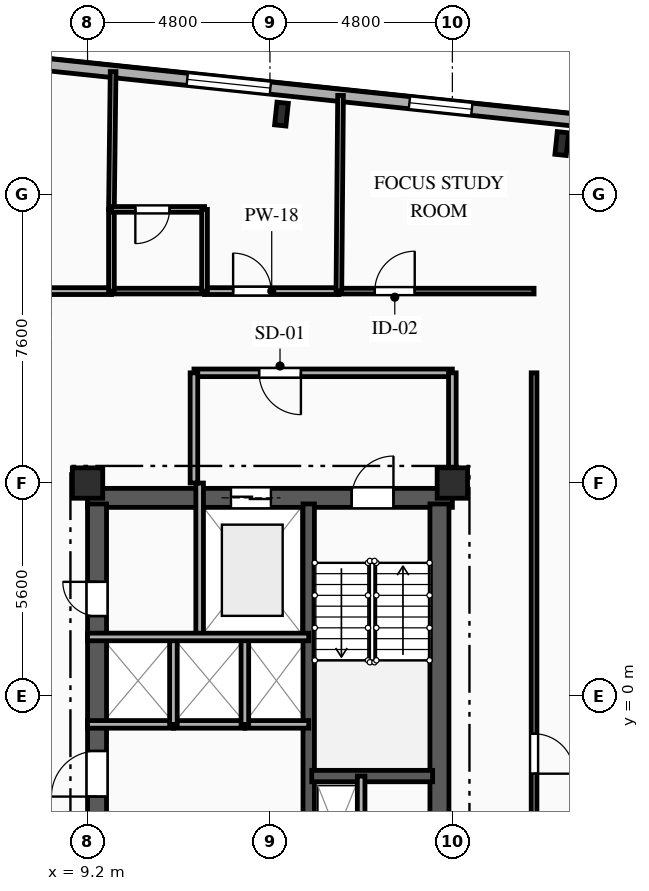
"""IFC4 building model, lengths in metres.
Left out: names, types, materials, properties, quantities, classifications, styles, units other than length and angle.
Written with IfcOpenShell. Run it as: python <this file> out.ifc"""

import sys

from ifc_helpers import new_model, si_unit, direction, frame, frame_2d, origin, origin_2d, place, context, subcontext, project, spatial, rectangle, i_section, extrude, element, fill, save


model = new_model("IFC4")
c1 = context("Model", 3, precision=1e-05, world=origin(), true_north=direction((0.0, 1.0)))
c2 = subcontext(c1, "Body", "Model", "MODEL_VIEW")
j1 = project(units=[si_unit("LENGTHUNIT", "METRE"), si_unit("PLANEANGLEUNIT", "RADIAN")], contexts=[c1])
p1 = place(None, origin())
s1 = spatial("IfcSite", under=j1, at=p1, CompositionType="ELEMENT")
p2 = place(p1, origin())
s2 = spatial("IfcBuilding", under=s1, at=p2, CompositionType="ELEMENT")
p3 = place(p2, frame((0.0, 0.0, 186.35)))
s3 = spatial("IfcBuildingStorey", under=s2, at=p3, CompositionType="ELEMENT", Elevation=186.35)
for number, where, z_axis, x_axis in (
    (1, (9.2, 5.6, 0.0), (0.0, 0.0, 1.0), (1.0, 0.0, 0.0)),
    (2, (18.8, 5.6, 0.0), (0.0, 0.0, 1.0), (1.0, 0.0, 0.0)),
):
    element("IfcColumn", number, at=place(p3, frame(where, z_axis=z_axis, x_axis=x_axis)), inside=s3, PredefinedType="COLUMN", context=c2, shape_type="SweptSolid", body=[
        extrude(rectangle(XDim=0.8, YDim=0.8, at=origin_2d()), origin(), (0.0, 0.0, 1.0), 3.35),
    ])
for number, where, z_axis, x_axis in (
    (3, (21.679, 14.532, 0.0), (0.0, 0.0, 1.0), (0.995, -0.105, 0.0)),
    (4, (14.303, 15.308, 0.0), (0.0, 0.0, 1.0), (0.995, -0.105, 0.0)),
):
    element("IfcColumn", number, at=place(p3, frame(where, z_axis=z_axis, x_axis=x_axis)), inside=s3, PredefinedType="COLUMN", context=c2, shape_type="SweptSolid", body=[
        extrude(i_section(OverallWidth=0.3, OverallDepth=0.6, WebThickness=0.015, FlangeThickness=0.03, FilletRadius=0.027, at=origin_2d()), origin(), (0.0, 0.0, 1.0), 3.35),
    ])
p4 = place(p3, frame((-23.156, 19.898, 0.0), z_axis=(0.0, 0.0, 1.0), x_axis=(0.994522001802, -0.104527450613, 0.0)))
e5 = element("IfcWall", 5, at=p4, inside=s3, PredefinedType="SOLIDWALL", context=c2, shape_type="SweptSolid", body=[
    extrude(rectangle(XDim=45.8, YDim=0.32, at=frame_2d((22.9, 0.0))), origin(), (0.0, 0.0, 1.0), 3.04),
])
p5 = place(p4, frame((4.94, 0.0, 0.85)))
e6 = element("IfcOpeningElement", 6, at=p5, cuts=e5, PredefinedType="OPENING", context=c2, shape_type="SweptSolid", body=[
    extrude(rectangle(XDim=1.65, YDim=1.85, at=frame_2d((0.825, 0.925))), frame((0.0, 0.17, 0.0), z_axis=(0.0, -1.0, 0.0), x_axis=(1.0, 0.0, 0.0)), (0.0, 0.0, 1.0), 0.34),
])
p6 = place(p4, frame((12.622, 0.0, 0.85)))
e7 = element("IfcOpeningElement", 7, at=p6, cuts=e5, PredefinedType="OPENING", context=c2, shape_type="SweptSolid", body=[
    extrude(rectangle(XDim=1.5, YDim=1.85, at=frame_2d((0.75, 0.925))), frame((0.0, 0.17, 0.0), z_axis=(0.0, -1.0, 0.0), x_axis=(1.0, 0.0, 0.0)), (0.0, 0.0, 1.0), 0.34),
])
p7 = place(p4, frame((17.116, 0.0, 0.85)))
e8 = element("IfcOpeningElement", 8, at=p7, cuts=e5, PredefinedType="OPENING", context=c2, shape_type="SweptSolid", body=[
    extrude(rectangle(XDim=2.2, YDim=1.85, at=frame_2d((1.1, 0.925))), frame((0.0, 0.17, 0.0), z_axis=(0.0, -1.0, 0.0), x_axis=(1.0, 0.0, 0.0)), (0.0, 0.0, 1.0), 0.34),
])
p8 = place(p4, frame((23.121, 0.0, 0.85)))
e9 = element("IfcOpeningElement", 9, at=p8, cuts=e5, PredefinedType="OPENING", context=c2, shape_type="SweptSolid", body=[
    extrude(rectangle(XDim=2.2, YDim=1.85, at=frame_2d((1.1, 0.925))), frame((0.0, 0.17, 0.0), z_axis=(0.0, -1.0, 0.0), x_axis=(1.0, 0.0, 0.0)), (0.0, 0.0, 1.0), 0.34),
])
p9 = place(p4, frame((29.126, 0.0, 0.85)))
e10 = element("IfcOpeningElement", 10, at=p9, cuts=e5, PredefinedType="OPENING", context=c2, shape_type="SweptSolid", body=[
    extrude(rectangle(XDim=2.2, YDim=1.85, at=frame_2d((1.1, 0.925))), frame((0.0, 0.17, 0.0), z_axis=(0.0, -1.0, 0.0), x_axis=(1.0, 0.0, 0.0)), (0.0, 0.0, 1.0), 0.34),
])
p10 = place(p4, frame((35.172, 0.0, 0.85)))
e11 = element("IfcOpeningElement", 11, at=p10, cuts=e5, PredefinedType="OPENING", context=c2, shape_type="SweptSolid", body=[
    extrude(rectangle(XDim=2.2, YDim=1.85, at=frame_2d((1.1, 0.925))), frame((0.0, 0.17, 0.0), z_axis=(0.0, -1.0, 0.0), x_axis=(1.0, 0.0, 0.0)), (0.0, 0.0, 1.0), 0.34),
])
p11 = place(p4, frame((41.052, 0.0, 0.85)))
e12 = element("IfcOpeningElement", 12, at=p11, cuts=e5, PredefinedType="OPENING", context=c2, shape_type="SweptSolid", body=[
    extrude(rectangle(XDim=1.65, YDim=1.85, at=frame_2d((0.825, 0.925))), frame((0.0, 0.17, 0.0), z_axis=(0.0, -1.0, 0.0), x_axis=(1.0, 0.0, 0.0)), (0.0, 0.0, 1.0), 0.34),
])
p12 = place(p3, frame((9.2, 5.21, 0.0), z_axis=(0.0, 0.0, 1.0), x_axis=(1.0, 0.0, 0.0)))
e13 = element("IfcWall", 13, at=p12, inside=s3, PredefinedType="SHEAR", context=c2, shape_type="SweptSolid", body=[
    extrude(rectangle(XDim=9.6, YDim=0.5, at=frame_2d((4.8, 0.0))), origin(), (0.0, 0.0, 1.0), 3.04),
])
p13 = place(p12, frame((6.95, 0.0, 0.0)))
e14 = element("IfcOpeningElement", 14, at=p13, cuts=e13, PredefinedType="OPENING", context=c2, shape_type="SweptSolid", body=[
    extrude(rectangle(XDim=1.1, YDim=2.15, at=frame_2d((0.55, 1.075))), frame((0.0, 0.26, 0.0), z_axis=(0.0, -1.0, 0.0), x_axis=(1.0, 0.0, 0.0)), (0.0, 0.0, 1.0), 0.52),
])
p14 = place(p12, frame((3.775, 0.0, 0.0)))
e15 = element("IfcOpeningElement", 15, at=p14, cuts=e13, PredefinedType="OPENING", context=c2, shape_type="SweptSolid", body=[
    extrude(rectangle(XDim=1.05, YDim=2.1, at=frame_2d((0.525, 1.05))), frame((0.0, 0.26, 0.0), z_axis=(0.0, -1.0, 0.0), x_axis=(1.0, 0.0, 0.0)), (0.0, 0.0, 1.0), 0.52),
])
p15 = place(p3, frame((9.45, -5.05, 0.0), z_axis=(0.0, 0.0, 1.0), x_axis=(0.0, 1.0, 0.0)))
e16 = element("IfcWall", 16, at=p15, inside=s3, PredefinedType="SHEAR", context=c2, shape_type="SweptSolid", body=[
    extrude(rectangle(XDim=10.1, YDim=0.5, at=frame_2d((5.05, 0.0))), origin(), (0.0, 0.0, 1.0), 3.04),
])
p16 = place(p15, frame((7.15, 0.0, 0.0)))
e17 = element("IfcOpeningElement", 17, at=p16, cuts=e16, PredefinedType="OPENING", context=c2, shape_type="SweptSolid", body=[
    extrude(rectangle(XDim=0.9, YDim=2.1, at=frame_2d((0.45, 1.05))), frame((0.0, 0.26, 0.0), z_axis=(0.0, -1.0, 0.0), x_axis=(1.0, 0.0, 0.0)), (0.0, 0.0, 1.0), 0.52),
])
p17 = place(p15, frame((2.4, 0.0, 0.0)))
e18 = element("IfcOpeningElement", 18, at=p17, cuts=e16, PredefinedType="OPENING", context=c2, shape_type="SweptSolid", body=[
    extrude(rectangle(XDim=1.2, YDim=2.15, at=frame_2d((0.6, 1.075))), frame((0.0, 0.26, 0.0), z_axis=(0.0, -1.0, 0.0), x_axis=(1.0, 0.0, 0.0)), (0.0, 0.0, 1.0), 0.52),
])
p18 = place(p3, frame((18.46, -5.05, 0.0), z_axis=(0.0, 0.0, 1.0), x_axis=(0.0, 1.0, 0.0)))
e19 = element("IfcWall", 19, at=p18, inside=s3, PredefinedType="SHEAR", context=c2, shape_type="SweptSolid", body=[
    extrude(rectangle(XDim=10.1, YDim=0.5, at=frame_2d((5.05, 0.0))), origin(), (0.0, 0.0, 1.0), 3.04),
])
p19 = place(p3, frame((15.02, -5.05, 0.0), z_axis=(0.0, 0.0, 1.0), x_axis=(0.0, 1.0, 0.0)))
e20 = element("IfcWall", 20, at=p19, inside=s3, PredefinedType="SHEAR", context=c2, shape_type="SweptSolid", body=[
    extrude(rectangle(XDim=10.1, YDim=0.3, at=frame_2d((5.05, 0.0))), origin(), (0.0, 0.0, 1.0), 3.04),
])
p20 = place(p3, frame((15.1, -2.11, 0.0), z_axis=(0.0, 0.0, 1.0), x_axis=(1.0, 0.0, 0.0)))
e21 = element("IfcWall", 21, at=p20, inside=s3, PredefinedType="SHEAR", context=c2, shape_type="SweptSolid", body=[
    extrude(rectangle(XDim=3.18, YDim=0.3, at=frame_2d((1.59, 0.0))), origin(), (0.0, 0.0, 1.0), 3.04),
])
p21 = place(p3, frame((16.4, -2.11, 0.0), z_axis=(0.0, 0.0, 1.0), x_axis=(0.0, -1.0, 0.0)))
e22 = element("IfcWall", 22, at=p21, inside=s3, PredefinedType="PARTITIONING", context=c2, shape_type="SweptSolid", body=[
    extrude(rectangle(XDim=3.49, YDim=0.2, at=frame_2d((1.745, 0.0))), origin(), (0.0, 0.0, 1.0), 3.04),
])
p22 = place(p3, frame((12.15, 5.6, 0.0), z_axis=(0.0, 0.0, 1.0), x_axis=(0.0, -1.0, 0.0)))
e23 = element("IfcWall", 23, at=p22, inside=s3, PredefinedType="PARTITIONING", context=c2, shape_type="SweptSolid", body=[
    extrude(rectangle(XDim=4.05, YDim=0.2, at=frame_2d((2.025, 0.0))), origin(), (0.0, 0.0, 1.0), 3.04),
])
p23 = place(p3, frame((18.8, 8.5, 0.0), z_axis=(0.0, 0.0, 1.0), x_axis=(-1.0, 0.0, 0.0)))
e24 = element("IfcWall", 24, at=p23, inside=s3, PredefinedType="PARTITIONING", context=c2, shape_type="SweptSolid", body=[
    extrude(rectangle(XDim=6.8, YDim=0.2, at=frame_2d((3.4, 0.0))), origin(), (0.0, 0.0, 1.0), 3.04),
])
p24 = place(p23, frame((3.985, 0.0, 0.0)))
e25 = element("IfcOpeningElement", 25, at=p24, cuts=e24, PredefinedType="OPENING", context=c2, shape_type="SweptSolid", body=[
    extrude(rectangle(XDim=1.1, YDim=2.15, at=frame_2d((0.55, 1.075))), frame((0.0, 0.11, 0.0), z_axis=(0.0, -1.0, 0.0), x_axis=(1.0, 0.0, 0.0)), (0.0, 0.0, 1.0), 0.22),
])
p25 = place(p3, frame((18.8, 5.6, 0.0), z_axis=(0.0, 0.0, 1.0), x_axis=(0.0, 1.0, 0.0)))
e26 = element("IfcWall", 26, at=p25, inside=s3, PredefinedType="PARTITIONING", context=c2, shape_type="SweptSolid", body=[
    extrude(rectangle(XDim=2.9, YDim=0.2, at=frame_2d((1.45, 0.0))), origin(), (0.0, 0.0, 1.0), 2.665),
])
p26 = place(p3, frame((12.0, 8.5, 0.0), z_axis=(0.0, 0.0, 1.0), x_axis=(0.0, -1.0, 0.0)))
e27 = element("IfcWall", 27, at=p26, inside=s3, PredefinedType="PARTITIONING", context=c2, shape_type="SweptSolid", body=[
    extrude(rectangle(XDim=2.9, YDim=0.2, at=frame_2d((1.45, 0.0))), origin(), (0.0, 0.0, 1.0), 3.04),
])
p27 = place(p3, frame((11.46, -0.75, 0.0), z_axis=(0.0, 0.0, 1.0), x_axis=(-1.0, 0.0, 0.0)))
e28 = element("IfcWall", 28, at=p27, inside=s3, PredefinedType="PARTITIONING", context=c2, shape_type="SweptSolid", body=[
    extrude(rectangle(XDim=2.26, YDim=0.2, at=frame_2d((1.13, 0.0))), origin(), (0.0, 0.0, 1.0), 3.04),
])
p28 = place(p3, frame((13.34, -0.75, 0.0), z_axis=(0.0, 0.0, 1.0), x_axis=(-1.0, 0.0, 0.0)))
e29 = element("IfcWall", 29, at=p28, inside=s3, PredefinedType="PARTITIONING", context=c2, shape_type="SweptSolid", body=[
    extrude(rectangle(XDim=1.88, YDim=0.2, at=frame_2d((0.94, 0.0))), origin(), (0.0, 0.0, 1.0), 3.04),
])
p29 = place(p3, frame((15.02, -0.75, 0.0), z_axis=(0.0, 0.0, 1.0), x_axis=(-1.0, 0.0, 0.0)))
e30 = element("IfcWall", 30, at=p29, inside=s3, PredefinedType="PARTITIONING", context=c2, shape_type="SweptSolid", body=[
    extrude(rectangle(XDim=1.68, YDim=0.2, at=frame_2d((0.84, 0.0))), origin(), (0.0, 0.0, 1.0), 3.04),
])
for number, where, z_axis, x_axis in (
    (31, (11.46, -0.75, 0.0), (0.0, 0.0, 1.0), (0.0, 1.0, 0.0)),
    (32, (13.34, -0.75, 0.0), (0.0, 0.0, 1.0), (0.0, 1.0, 0.0)),
):
    element("IfcWall", number, at=place(p3, frame(where, z_axis=z_axis, x_axis=x_axis)), inside=s3, PredefinedType="PARTITIONING", context=c2, shape_type="SweptSolid", body=[
        extrude(rectangle(XDim=2.3, YDim=0.2, at=frame_2d((1.15, 0.0))), origin(), (0.0, 0.0, 1.0), 3.04),
    ])
p30 = place(p3, frame((6.293, 10.65, 0.0), z_axis=(0.0, 0.0, 1.0), x_axis=(1.0, 0.0, 0.0)))
e33 = element("IfcWall", 33, at=p30, inside=s3, PredefinedType="PARTITIONING", context=c2, shape_type="SweptSolid", body=[
    extrude(rectangle(XDim=3.536, YDim=0.18, at=frame_2d((1.768, 0.0))), origin(), (0.0, 0.0, 1.0), 3.04),
])
p31 = place(p30, frame((0.752, 0.0, 0.0)))
e34 = element("IfcOpeningElement", 34, at=p31, cuts=e33, PredefinedType="OPENING", context=c2, shape_type="SweptSolid", body=[
    extrude(rectangle(XDim=1.0, YDim=2.15, at=frame_2d((0.5, 1.075))), frame((0.0, 0.1, 0.0), z_axis=(0.0, -1.0, 0.0), x_axis=(1.0, 0.0, 0.0)), (0.0, 0.0, 1.0), 0.2),
])
p32 = place(p3, frame((12.279, 10.65, 0.0), z_axis=(0.0, 0.0, 1.0), x_axis=(1.0, 0.0, 0.0)))
e35 = element("IfcWall", 35, at=p32, inside=s3, PredefinedType="PARTITIONING", context=c2, shape_type="SweptSolid", body=[
    extrude(rectangle(XDim=3.535, YDim=0.18, at=frame_2d((1.768, 0.0))), origin(), (0.0, 0.0, 1.0), 3.04),
])
p33 = place(p32, frame((0.752, 0.0, 0.0)))
e36 = element("IfcOpeningElement", 36, at=p33, cuts=e35, PredefinedType="OPENING", context=c2, shape_type="SweptSolid", body=[
    extrude(rectangle(XDim=1.0, YDim=2.15, at=frame_2d((0.5, 1.075))), frame((0.0, 0.1, 0.0), z_axis=(0.0, -1.0, 0.0), x_axis=(1.0, 0.0, 0.0)), (0.0, 0.0, 1.0), 0.2),
])
p34 = place(p3, frame((9.829, 10.65, 0.0), z_axis=(0.0, 0.0, 1.0), x_axis=(1.0, 0.0, 0.0)))
e37 = element("IfcWall", 37, at=p34, inside=s3, PredefinedType="PLUMBINGWALL", context=c2, shape_type="SweptSolid", body=[
    extrude(rectangle(XDim=2.45, YDim=0.15, at=frame_2d((1.225, 0.0))), origin(), (0.0, 0.0, 1.0), 3.04),
])
p35 = place(p3, frame((15.814, 10.65, 0.0), z_axis=(0.0, 0.0, 1.0), x_axis=(1.0, 0.0, 0.0)))
e38 = element("IfcWall", 38, at=p35, inside=s3, PredefinedType="PARTITIONING", context=c2, shape_type="SweptSolid", body=[
    extrude(rectangle(XDim=5.136, YDim=0.15, at=frame_2d((2.568, 0.0))), origin(), (0.0, 0.0, 1.0), 3.04),
])
p36 = place(p35, frame((0.946, 0.0, 0.0)))
e39 = element("IfcOpeningElement", 39, at=p36, cuts=e38, PredefinedType="OPENING", context=c2, shape_type="SweptSolid", body=[
    extrude(rectangle(XDim=1.05, YDim=2.15, at=frame_2d((0.525, 1.075))), frame((0.0, 0.085, 0.0), z_axis=(0.0, -1.0, 0.0), x_axis=(1.0, 0.0, 0.0)), (0.0, 0.0, 1.0), 0.17),
])
p37 = place(p3, frame((20.95, 8.5, 0.0), z_axis=(0.0, 0.0, 1.0), x_axis=(0.0, -1.0, 0.0)))
e40 = element("IfcWall", 40, at=p37, inside=s3, PredefinedType="PARTITIONING", context=c2, shape_type="SweptSolid", body=[
    extrude(rectangle(XDim=14.1, YDim=0.15, at=frame_2d((7.05, 0.0))), origin(), (0.0, 0.0, 1.0), 2.695),
])
p38 = place(p37, frame((9.498, 0.0, 0.0)))
e41 = element("IfcOpeningElement", 41, at=p38, cuts=e40, PredefinedType="OPENING", context=c2, shape_type="SweptSolid", body=[
    extrude(rectangle(XDim=1.05, YDim=2.15, at=frame_2d((0.525, 1.075))), frame((0.0, 0.085, 0.0), z_axis=(0.0, -1.0, 0.0), x_axis=(1.0, 0.0, 0.0)), (0.0, 0.0, 1.0), 0.17),
])
p39 = place(p3, frame((9.873, 16.427, 0.0), z_axis=(0.0, 0.0, 1.0), x_axis=(-0.012048129237, -0.999927418657, 0.0)))
e42 = element("IfcWall", 42, at=p39, inside=s3, PredefinedType="PARTITIONING", context=c2, shape_type="SweptSolid", body=[
    extrude(rectangle(XDim=3.627, YDim=0.15, at=frame_2d((1.813, 0.0))), origin(), (0.0, 0.0, 1.0), 3.04),
])
p40 = place(p3, frame((9.829, 12.8, 0.0), z_axis=(0.0, 0.0, 1.0), x_axis=(0.0, -1.0, 0.0)))
e43 = element("IfcWall", 43, at=p40, inside=s3, PredefinedType="PLUMBINGWALL", context=c2, shape_type="SweptSolid", body=[
    extrude(rectangle(XDim=2.15, YDim=0.15, at=frame_2d((1.075, 0.0))), origin(), (0.0, 0.0, 1.0), 3.04),
])
p41 = place(p3, frame((12.279, 12.8, 0.0), z_axis=(0.0, 0.0, 1.0), x_axis=(-1.0, 0.0, 0.0)))
e44 = element("IfcWall", 44, at=p41, inside=s3, PredefinedType="PLUMBINGWALL", context=c2, shape_type="SweptSolid", body=[
    extrude(rectangle(XDim=2.45, YDim=0.15, at=frame_2d((1.225, 0.0))), origin(), (0.0, 0.0, 1.0), 3.04),
])
p42 = place(p41, frame((0.921, 0.0, 0.0)))
e45 = element("IfcOpeningElement", 45, at=p42, cuts=e44, PredefinedType="OPENING", context=c2, shape_type="SweptSolid", body=[
    extrude(rectangle(XDim=0.9, YDim=2.1, at=frame_2d((0.45, 1.05))), frame((0.0, 0.085, 0.0), z_axis=(0.0, -1.0, 0.0), x_axis=(1.0, 0.0, 0.0)), (0.0, 0.0, 1.0), 0.17),
])
p43 = place(p3, frame((12.279, 10.65, 0.0), z_axis=(0.0, 0.0, 1.0), x_axis=(0.0, 1.0, 0.0)))
e46 = element("IfcWall", 46, at=p43, inside=s3, PredefinedType="PLUMBINGWALL", context=c2, shape_type="SweptSolid", body=[
    extrude(rectangle(XDim=2.15, YDim=0.15, at=frame_2d((1.075, 0.0))), origin(), (0.0, 0.0, 1.0), 3.04),
])
p44 = place(p3, frame((15.858, 15.798, 0.0), z_axis=(0.0, 0.0, 1.0), x_axis=(-0.008536158681, -0.999963566334, 0.0)))
e47 = element("IfcWall", 47, at=p44, inside=s3, PredefinedType="PARTITIONING", context=c2, shape_type="SweptSolid", body=[
    extrude(rectangle(XDim=5.148, YDim=0.15, at=frame_2d((2.574, 0.0))), origin(), (0.0, 0.0, 1.0), 3.04),
])
p45 = place(p3, frame((9.2, 1.55, 0.0), z_axis=(0.0, 0.0, 1.0), x_axis=(1.0, 0.0, 0.0)))
e48 = element("IfcWall", 48, at=p45, inside=s3, PredefinedType="PARTITIONING", context=c2, shape_type="SweptSolid", body=[
    extrude(rectangle(XDim=5.82, YDim=0.2, at=frame_2d((2.91, 0.0))), origin(), (0.0, 0.0, 1.0), 3.04),
])
p46 = place(p10, origin())
e49 = element("IfcWindow", 49, at=p46, inside=s3, PartitioningType="SINGLE_PANEL", PredefinedType="WINDOW", context=c2, shape_type="SweptSolid", body=[
    extrude(rectangle(XDim=2.2, YDim=1.85, at=frame_2d((1.1, 0.925))), frame((0.0, 0.03, 0.0), z_axis=(0.0, -1.0, 0.0), x_axis=(1.0, 0.0, 0.0)), (0.0, 0.0, 1.0), 0.06),
])
fill(e11, e49)
p47 = place(p11, origin())
e50 = element("IfcWindow", 50, at=p47, inside=s3, PartitioningType="SINGLE_PANEL", PredefinedType="WINDOW", context=c2, shape_type="SweptSolid", body=[
    extrude(rectangle(XDim=1.65, YDim=1.85, at=frame_2d((0.825, 0.925))), frame((0.0, 0.03, 0.0), z_axis=(0.0, -1.0, 0.0), x_axis=(1.0, 0.0, 0.0)), (0.0, 0.0, 1.0), 0.06),
])
fill(e12, e50)
p48 = place(p13, origin())
e51 = element("IfcDoor", 51, at=p48, inside=s3, OperationType="SINGLE_SWING_RIGHT", PredefinedType="DOOR", context=c2, shape_type="SweptSolid", body=[
    extrude(rectangle(XDim=1.1, YDim=2.15, at=frame_2d((0.55, 1.075))), frame((0.0, 0.025, 0.0), z_axis=(0.0, -1.0, 0.0), x_axis=(1.0, 0.0, 0.0)), (0.0, 0.0, 1.0), 0.05),
])
fill(e14, e51)
p49 = place(p14, origin())
e52 = element("IfcDoor", 52, at=p49, inside=s3, OperationType="DOUBLE_DOOR_SLIDING", PredefinedType="DOOR", context=c2, shape_type="SweptSolid", body=[
    extrude(rectangle(XDim=1.05, YDim=2.1, at=frame_2d((0.525, 1.05))), frame((0.0, 0.025, 0.0), z_axis=(0.0, -1.0, 0.0), x_axis=(1.0, 0.0, 0.0)), (0.0, 0.0, 1.0), 0.05),
])
fill(e15, e52)
p50 = place(p24, origin())
e53 = element("IfcDoor", 53, at=p50, inside=s3, OperationType="SINGLE_SWING_LEFT", PredefinedType="DOOR", context=c2, shape_type="SweptSolid", body=[
    extrude(rectangle(XDim=1.1, YDim=2.15, at=frame_2d((0.55, 1.075))), frame((0.0, 0.025, 0.0), z_axis=(0.0, -1.0, 0.0), x_axis=(1.0, 0.0, 0.0)), (0.0, 0.0, 1.0), 0.05),
])
fill(e25, e53)
p51 = place(p16, origin())
e54 = element("IfcDoor", 54, at=p51, inside=s3, OperationType="SINGLE_SWING_RIGHT", PredefinedType="DOOR", context=c2, shape_type="SweptSolid", body=[
    extrude(rectangle(XDim=0.9, YDim=2.1, at=frame_2d((0.45, 1.05))), frame((0.0, 0.025, 0.0), z_axis=(0.0, -1.0, 0.0), x_axis=(1.0, 0.0, 0.0)), (0.0, 0.0, 1.0), 0.05),
])
fill(e17, e54)
p52 = place(p17, origin())
e55 = element("IfcDoor", 55, at=p52, inside=s3, OperationType="SINGLE_SWING_LEFT", PredefinedType="DOOR", context=c2, shape_type="SweptSolid", body=[
    extrude(rectangle(XDim=1.2, YDim=2.15, at=frame_2d((0.6, 1.075))), frame((0.0, 0.025, 0.0), z_axis=(0.0, -1.0, 0.0), x_axis=(1.0, 0.0, 0.0)), (0.0, 0.0, 1.0), 0.05),
])
fill(e18, e55)
p53 = place(p33, origin())
e56 = element("IfcDoor", 56, at=p53, inside=s3, OperationType="SINGLE_SWING_LEFT", PredefinedType="DOOR", context=c2, shape_type="SweptSolid", body=[
    extrude(rectangle(XDim=1.0, YDim=2.15, at=frame_2d((0.5, 1.075))), frame((0.0, 0.025, 0.0), z_axis=(0.0, -1.0, 0.0), x_axis=(1.0, 0.0, 0.0)), (0.0, 0.0, 1.0), 0.05),
])
fill(e36, e56)
p54 = place(p36, origin())
e57 = element("IfcDoor", 57, at=p54, inside=s3, OperationType="SINGLE_SWING_RIGHT", PredefinedType="DOOR", context=c2, shape_type="SweptSolid", body=[
    extrude(rectangle(XDim=1.05, YDim=2.15, at=frame_2d((0.525, 1.075))), frame((0.0, 0.025, 0.0), z_axis=(0.0, -1.0, 0.0), x_axis=(1.0, 0.0, 0.0)), (0.0, 0.0, 1.0), 0.05),
])
fill(e39, e57)
p55 = place(p38, origin())
e58 = element("IfcDoor", 58, at=p55, inside=s3, OperationType="SINGLE_SWING_RIGHT", PredefinedType="DOOR", context=c2, shape_type="SweptSolid", body=[
    extrude(rectangle(XDim=1.05, YDim=2.15, at=frame_2d((0.525, 1.075))), frame((0.0, 0.025, 0.0), z_axis=(0.0, -1.0, 0.0), x_axis=(1.0, 0.0, 0.0)), (0.0, 0.0, 1.0), 0.05),
])
fill(e41, e58)
p56 = place(p42, origin())
e59 = element("IfcDoor", 59, at=p56, inside=s3, OperationType="SINGLE_SWING_RIGHT", PredefinedType="DOOR", context=c2, shape_type="SweptSolid", body=[
    extrude(rectangle(XDim=0.9, YDim=2.1, at=frame_2d((0.45, 1.05))), frame((0.0, 0.025, 0.0), z_axis=(0.0, -1.0, 0.0), x_axis=(1.0, 0.0, 0.0)), (0.0, 0.0, 1.0), 0.05),
])
fill(e45, e59)
save(model, sys.argv[1])
